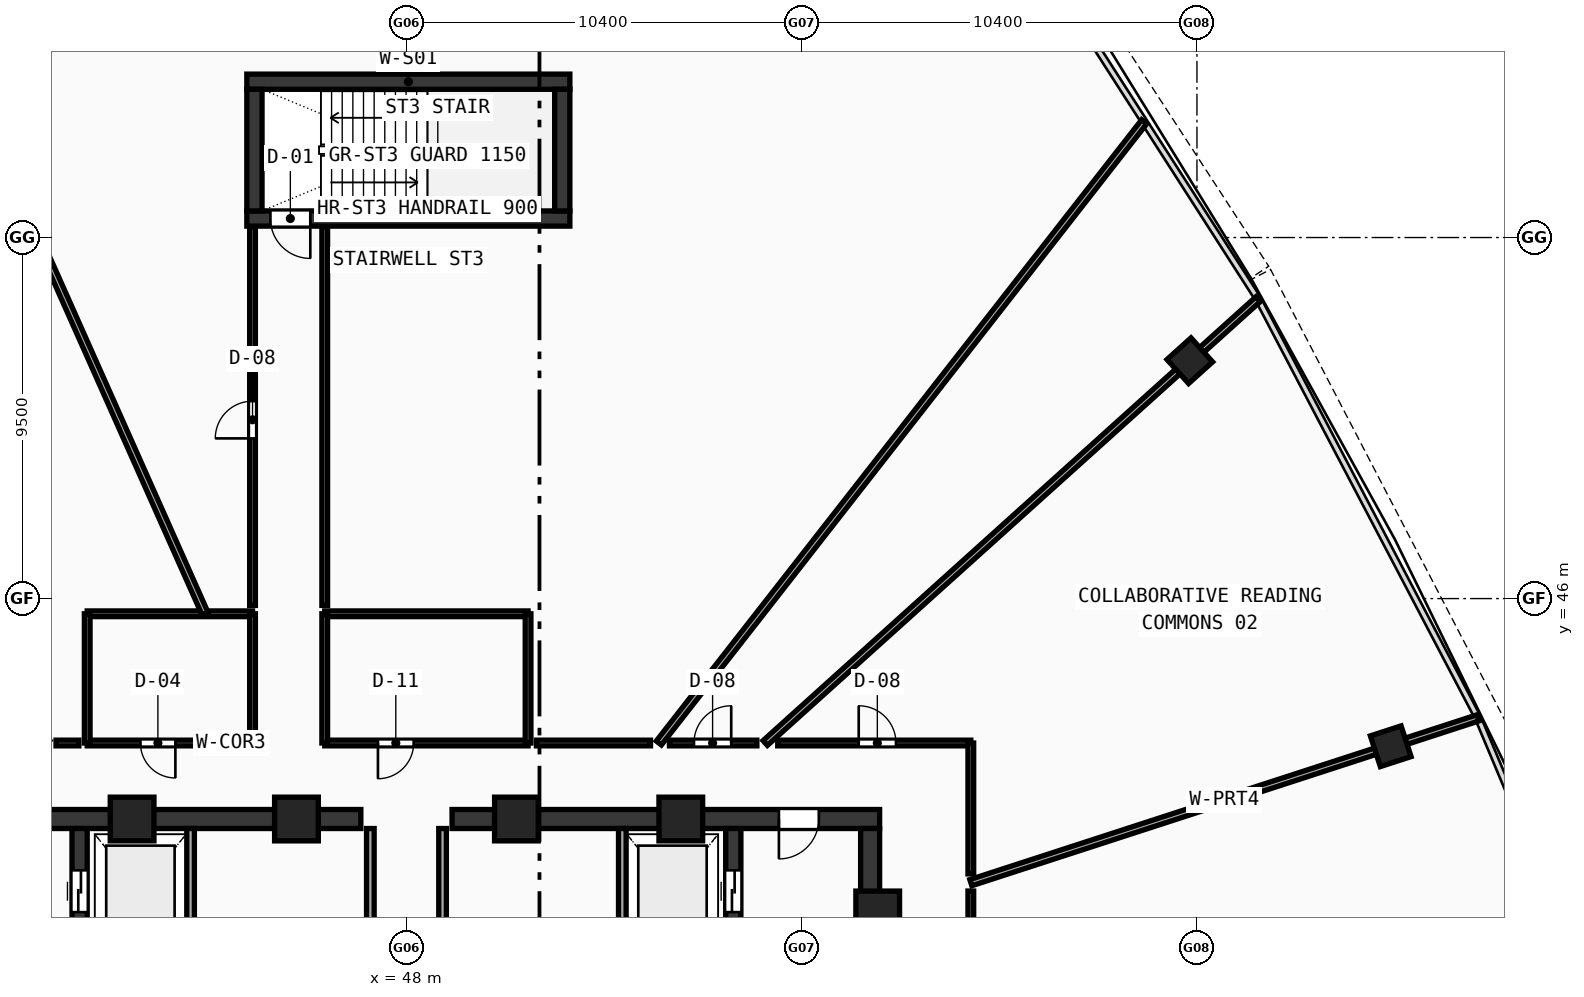
"""IFC4 building model, lengths in metres.
Left out: names, types, materials, properties, quantities, classifications, styles, units other than length and angle.
Written with IfcOpenShell. Run it as: python <this file> out.ifc"""

import sys

from ifc_helpers import new_model, si_unit, direction, frame, frame_2d, origin, origin_with_axes, origin_2d, place, context, subcontext, project, spatial, rectangle, hollow_rectangle, extrude, source, transform, mapped, element, fill, save


model = new_model("IFC4")
c1 = context("Model", 3, precision=1e-05, world=origin(), true_north=direction((0.0, 1.0)))
c2 = subcontext(c1, "Body", "Model", "MODEL_VIEW")
j1 = project(units=[si_unit("LENGTHUNIT", "METRE"), si_unit("PLANEANGLEUNIT", "RADIAN")], contexts=[c1])
p1 = place(None, origin())
s1 = spatial("IfcSite", under=j1, at=p1, CompositionType="ELEMENT")
p2 = place(p1, origin())
s2 = spatial("IfcBuilding", under=s1, at=p2, CompositionType="ELEMENT")
p3 = place(p2, frame((0.0, 0.0, 240.8)))
s3 = spatial("IfcBuildingStorey", under=s2, at=p3, CompositionType="ELEMENT", Elevation=240.8)
p4 = place(p3, frame((35.55, 40.2, 0.0), z_axis=(0.0, 0.0, 1.0), x_axis=(1.0, 0.0, 0.0)))
e1 = element("IfcWall", 1, at=p4, inside=s3, PredefinedType="SHEAR", context=c2, shape_type="SweptSolid", body=[
    extrude(rectangle(XDim=11.25, YDim=0.5, at=frame_2d((5.625, 0.0))), origin(), (0.0, 0.0, 1.0), 3.47),
])
p5 = place(p4, frame((1.6, 0.0, 0.0)))
e2 = element("IfcOpeningElement", 2, at=p5, cuts=e1, PredefinedType="OPENING", context=c2, shape_type="SweptSolid", body=[
    extrude(rectangle(XDim=1.05, YDim=2.1, at=frame_2d((0.525, 1.05))), frame((0.0, 0.26, 0.0), z_axis=(0.0, -1.0, 0.0), x_axis=(1.0, 0.0, 0.0)), (0.0, 0.0, 1.0), 0.52),
])
p6 = place(p3, frame((49.2, 40.2, 0.0), z_axis=(0.0, 0.0, 1.0), x_axis=(1.0, 0.0, 0.0)))
e3 = element("IfcWall", 3, at=p6, inside=s3, PredefinedType="SHEAR", context=c2, shape_type="SweptSolid", body=[
    extrude(rectangle(XDim=11.25, YDim=0.5, at=frame_2d((5.625, 0.0))), origin(), (0.0, 0.0, 1.0), 3.47),
])
p7 = place(p6, frame((8.6, 0.0, 0.0)))
e4 = element("IfcOpeningElement", 4, at=p7, cuts=e3, PredefinedType="OPENING", context=c2, shape_type="SweptSolid", body=[
    extrude(rectangle(XDim=1.05, YDim=2.1, at=frame_2d((0.525, 1.05))), frame((0.0, 0.26, 0.0), z_axis=(0.0, -1.0, 0.0), x_axis=(1.0, 0.0, 0.0)), (0.0, 0.0, 1.0), 0.52),
])
p8 = place(p3, frame((60.2, 27.75, 0.0), z_axis=(0.0, 0.0, 1.0), x_axis=(0.0, 1.0, 0.0)))
e5 = element("IfcWall", 5, at=p8, inside=s3, PredefinedType="SHEAR", context=c2, shape_type="SweptSolid", body=[
    extrude(rectangle(XDim=12.2, YDim=0.5, at=frame_2d((6.1, 0.0))), origin(), (0.0, 0.0, 1.0), 3.47),
])
p9 = place(p3, frame((39.4, 27.75, 0.0), z_axis=(0.0, 0.0, 1.0), x_axis=(0.0, 1.0, 0.0)))
e6 = element("IfcWall", 6, at=p9, inside=s3, PredefinedType="SHEAR", context=c2, shape_type="SweptSolid", body=[
    extrude(rectangle(XDim=12.2, YDim=0.4, at=frame_2d((6.1, 0.0))), origin(), (0.0, 0.0, 1.0), 3.47),
])
p10 = place(p9, frame((10.0, 0.0, 0.0)))
e7 = element("IfcOpeningElement", 7, at=p10, cuts=e6, PredefinedType="OPENING", context=c2, shape_type="SweptSolid", body=[
    extrude(rectangle(XDim=1.1, YDim=2.1, at=frame_2d((0.55, 1.05))), frame((0.0, 0.21, 0.0), z_axis=(0.0, -1.0, 0.0), x_axis=(1.0, 0.0, 0.0)), (0.0, 0.0, 1.0), 0.42),
])
p11 = place(p3, frame((56.6, 27.75, 0.0), z_axis=(0.0, 0.0, 1.0), x_axis=(0.0, 1.0, 0.0)))
e8 = element("IfcWall", 8, at=p11, inside=s3, PredefinedType="SHEAR", context=c2, shape_type="SweptSolid", body=[
    extrude(rectangle(XDim=12.2, YDim=0.4, at=frame_2d((6.1, 0.0))), origin(), (0.0, 0.0, 1.0), 3.47),
])
p12 = place(p11, frame((10.0, 0.0, 0.0)))
e9 = element("IfcOpeningElement", 9, at=p12, cuts=e8, PredefinedType="OPENING", context=c2, shape_type="SweptSolid", body=[
    extrude(rectangle(XDim=1.1, YDim=2.1, at=frame_2d((0.55, 1.05))), frame((0.0, 0.21, 0.0), z_axis=(0.0, -1.0, 0.0), x_axis=(1.0, 0.0, 0.0)), (0.0, 0.0, 1.0), 0.42),
])
p13 = place(p3, frame((43.8, 59.6, 0.0), z_axis=(0.0, 0.0, 1.0), x_axis=(1.0, 0.0, 0.0)))
e10 = element("IfcWall", 10, at=p13, inside=s3, PredefinedType="SHEAR", context=c2, shape_type="SweptSolid", body=[
    extrude(rectangle(XDim=8.5, YDim=0.4, at=frame_2d((4.25, 0.0))), origin(), (0.0, 0.0, 1.0), 3.47),
])
p14 = place(p3, frame((43.8, 56.0, 0.0), z_axis=(0.0, 0.0, 1.0), x_axis=(1.0, 0.0, 0.0)))
e11 = element("IfcWall", 11, at=p14, inside=s3, PredefinedType="SHEAR", context=c2, shape_type="SweptSolid", body=[
    extrude(rectangle(XDim=8.5, YDim=0.4, at=frame_2d((4.25, 0.0))), origin(), (0.0, 0.0, 1.0), 3.47),
])
p15 = place(p14, frame((0.62, 0.0, 0.0)))
e12 = element("IfcOpeningElement", 12, at=p15, cuts=e11, PredefinedType="OPENING", context=c2, shape_type="SweptSolid", body=[
    extrude(rectangle(XDim=1.05, YDim=2.1, at=frame_2d((0.525, 1.05))), frame((0.0, 0.21, 0.0), z_axis=(0.0, -1.0, 0.0), x_axis=(1.0, 0.0, 0.0)), (0.0, 0.0, 1.0), 0.42),
])
for number, where, z_axis, x_axis in (
    (13, (44.0, 56.2, 0.0), (0.0, 0.0, 1.0), (0.0, 1.0, 0.0)),
    (14, (52.1, 56.2, 0.0), (0.0, 0.0, 1.0), (0.0, 1.0, 0.0)),
):
    element("IfcWall", number, at=place(p3, frame(where, z_axis=z_axis, x_axis=x_axis)), inside=s3, PredefinedType="SHEAR", context=c2, shape_type="SweptSolid", body=[
        extrude(rectangle(XDim=3.2, YDim=0.4, at=frame_2d((1.6, 0.0))), origin(), (0.0, 0.0, 1.0), 3.47),
    ])
m1 = source(origin(), c2, "Body", "SweptSolid", [
    extrude(hollow_rectangle(XDim=1.15, YDim=1.15, WallThickness=0.048, at=origin_2d()), origin(), (0.0, 0.0, 1.0), 3.73),
])
for number, where, z_axis, x_axis in (
    (15, (60.4, 37.729, -0.26), (0.0, 0.0, 1.0), (1.0, 0.0, 0.0)),
    (16, (55.219, 40.2, -0.26), (0.0, 0.0, 1.0), (1.0, 0.0, 0.0)),
    (17, (50.894, 40.2, -0.26), (0.0, 0.0, 1.0), (1.0, 0.0, 0.0)),
    (18, (45.106, 40.2, -0.26), (0.0, 0.0, 1.0), (1.0, 0.0, 0.0)),
    (19, (40.781, 40.2, -0.26), (0.0, 0.0, 1.0), (1.0, 0.0, 0.0)),
):
    element("IfcColumn", number, at=place(p3, frame(where, z_axis=z_axis, x_axis=x_axis)), inside=s3, PredefinedType="COLUMN", context=c2, shape_type="MappedRepresentation", body=[
        mapped(m1, transform((0.0, 0.0, 0.0), scale=1.0)),
    ])
m2 = source(origin(), c2, "Body", "SweptSolid", [
    extrude(hollow_rectangle(XDim=0.85, YDim=0.85, WallThickness=0.034, at=origin_2d()), origin(), (0.0, 0.0, 1.0), 3.73),
])
for number, where, z_axis, x_axis in (
    (20, (73.899, 42.115, -0.26), (0.0, 0.0, 1.0), (-0.309, 0.951, 0.0)),
    (21, (68.612, 52.259, -0.26), (0.0, 0.0, 1.0), (-0.669, 0.743, 0.0)),
):
    element("IfcColumn", number, at=place(p3, frame(where, z_axis=z_axis, x_axis=x_axis)), inside=s3, PredefinedType="COLUMN", context=c2, shape_type="MappedRepresentation", body=[
        mapped(m2, transform((0.0, 0.0, 0.0), scale=1.0)),
    ])
p16 = place(p3, frame((42.32, 33.5, 0.0), z_axis=(0.0, 0.0, 1.0), x_axis=(0.0, 1.0, 0.0)))
e22 = element("IfcWall", 22, at=p16, inside=s3, PredefinedType="SOLIDWALL", context=c2, shape_type="SweptSolid", body=[
    extrude(rectangle(XDim=6.45, YDim=0.2, at=frame_2d((3.225, 0.0))), origin(), (0.0, 0.0, 1.0), 3.47),
])
p17 = place(p16, frame((1.0, 0.0, 0.0)))
e23 = element("IfcOpeningElement", 23, at=p17, cuts=e22, PredefinedType="OPENING", context=c2, shape_type="SweptSolid", body=[
    extrude(rectangle(XDim=1.05, YDim=2.1, at=frame_2d((0.525, 1.05))), frame((0.0, 0.11, 0.0), z_axis=(0.0, -1.0, 0.0), x_axis=(1.0, 0.0, 0.0)), (0.0, 0.0, 1.0), 0.22),
])
p18 = place(p3, frame((53.68, 36.65, 0.0), z_axis=(0.0, 0.0, 1.0), x_axis=(0.0, 1.0, 0.0)))
e24 = element("IfcWall", 24, at=p18, inside=s3, PredefinedType="SOLIDWALL", context=c2, shape_type="SweptSolid", body=[
    extrude(rectangle(XDim=3.3, YDim=0.2, at=frame_2d((1.65, 0.0))), origin(), (0.0, 0.0, 1.0), 3.47),
])
for number, where, z_axis, x_axis in (
    (25, (47.05, 35.85, 0.0), (0.0, 0.0, 1.0), (0.0, 1.0, 0.0)),
    (26, (48.95, 35.85, 0.0), (0.0, 0.0, 1.0), (0.0, 1.0, 0.0)),
):
    element("IfcWall", number, at=place(p3, frame(where, z_axis=z_axis, x_axis=x_axis)), inside=s3, PredefinedType="SOLIDWALL", context=c2, shape_type="SweptSolid", body=[
        extrude(rectangle(XDim=4.1, YDim=0.2, at=frame_2d((2.05, 0.0))), origin(), (0.0, 0.0, 1.0), 3.47),
    ])
p19 = place(p3, frame((39.6, 42.2, 0.0), z_axis=(0.0, 0.0, 1.0), x_axis=(1.0, 0.0, 0.0)))
e27 = element("IfcWall", 27, at=p19, inside=s3, PredefinedType="PARTITIONING", context=c2, shape_type="SweptSolid", body=[
    extrude(rectangle(XDim=4.35, YDim=0.15, at=frame_2d((2.175, 0.0))), origin(), (0.0, 0.0, 1.0), 3.47),
])
p20 = place(p19, frame((1.4, 0.0, 0.0)))
e28 = element("IfcOpeningElement", 28, at=p20, cuts=e27, PredefinedType="OPENING", context=c2, shape_type="SweptSolid", body=[
    extrude(rectangle(XDim=0.92, YDim=2.1, at=frame_2d((0.46, 1.05))), frame((0.0, 0.085, 0.0), z_axis=(0.0, -1.0, 0.0), x_axis=(1.0, 0.0, 0.0)), (0.0, 0.0, 1.0), 0.17),
])
p21 = place(p3, frame((39.6, 45.6, 0.0), z_axis=(0.0, 0.0, 1.0), x_axis=(1.0, 0.0, 0.0)))
e29 = element("IfcWall", 29, at=p21, inside=s3, PredefinedType="PARTITIONING", context=c2, shape_type="SweptSolid", body=[
    extrude(rectangle(XDim=4.35, YDim=0.15, at=frame_2d((2.175, 0.0))), origin(), (0.0, 0.0, 1.0), 2.82),
])
p22 = place(p3, frame((39.6, 42.2, 0.0), z_axis=(0.0, 0.0, 1.0), x_axis=(0.0, 1.0, 0.0)))
e30 = element("IfcWall", 30, at=p22, inside=s3, PredefinedType="PARTITIONING", context=c2, shape_type="SweptSolid", body=[
    extrude(rectangle(XDim=3.4, YDim=0.15, at=frame_2d((1.7, 0.0))), origin(), (0.0, 0.0, 1.0), 3.47),
])
p23 = place(p3, frame((43.95, 42.2, 0.0), z_axis=(0.0, 0.0, 1.0), x_axis=(0.0, 1.0, 0.0)))
e31 = element("IfcWall", 31, at=p23, inside=s3, PredefinedType="PARTITIONING", context=c2, shape_type="SweptSolid", body=[
    extrude(rectangle(XDim=3.4, YDim=0.15, at=frame_2d((1.7, 0.0))), origin(), (0.0, 0.0, 1.0), 2.82),
])
p24 = place(p3, frame((45.85, 42.2, 0.0), z_axis=(0.0, 0.0, 1.0), x_axis=(1.0, 0.0, 0.0)))
e32 = element("IfcWall", 32, at=p24, inside=s3, PredefinedType="PARTITIONING", context=c2, shape_type="SweptSolid", body=[
    extrude(rectangle(XDim=5.35, YDim=0.15, at=frame_2d((2.675, 0.0))), origin(), (0.0, 0.0, 1.0), 3.47),
])
p25 = place(p24, frame((1.4, 0.0, 0.0)))
e33 = element("IfcOpeningElement", 33, at=p25, cuts=e32, PredefinedType="OPENING", context=c2, shape_type="SweptSolid", body=[
    extrude(rectangle(XDim=0.94, YDim=2.1, at=frame_2d((0.47, 1.05))), frame((0.0, 0.085, 0.0), z_axis=(0.0, -1.0, 0.0), x_axis=(1.0, 0.0, 0.0)), (0.0, 0.0, 1.0), 0.17),
])
p26 = place(p3, frame((45.85, 45.6, 0.0), z_axis=(0.0, 0.0, 1.0), x_axis=(1.0, 0.0, 0.0)))
e34 = element("IfcWall", 34, at=p26, inside=s3, PredefinedType="PARTITIONING", context=c2, shape_type="SweptSolid", body=[
    extrude(rectangle(XDim=5.35, YDim=0.15, at=frame_2d((2.675, 0.0))), origin(), (0.0, 0.0, 1.0), 3.47),
])
for number, where, z_axis, x_axis in (
    (35, (45.85, 42.2, 0.0), (0.0, 0.0, 1.0), (0.0, 1.0, 0.0)),
    (36, (51.2, 42.2, 0.0), (0.0, 0.0, 1.0), (0.0, 1.0, 0.0)),
):
    element("IfcWall", number, at=place(p3, frame(where, z_axis=z_axis, x_axis=x_axis)), inside=s3, PredefinedType="PARTITIONING", context=c2, shape_type="SweptSolid", body=[
        extrude(rectangle(XDim=3.4, YDim=0.15, at=frame_2d((1.7, 0.0))), origin(), (0.0, 0.0, 1.0), 3.47),
    ])
p27 = place(p3, frame((62.85, 38.525, 0.0), z_axis=(0.0, 0.0, 1.0), x_axis=(0.951060404644, 0.309005027011, 0.0)))
e37 = element("IfcWall", 37, at=p27, inside=s3, PredefinedType="PARTITIONING", context=c2, shape_type="SweptSolid", body=[
    extrude(rectangle(XDim=14.032, YDim=0.17, at=frame_2d((7.016, 0.0))), origin(), (0.0, 0.0, 1.0), 2.82),
])
p28 = place(p3, frame((57.44, 42.2, 0.0), z_axis=(0.0, 0.0, 1.0), x_axis=(0.743140424774, 0.669135493802, 0.0)))
e38 = element("IfcWall", 38, at=p28, inside=s3, PredefinedType="PARTITIONING", context=c2, shape_type="SweptSolid", body=[
    extrude(rectangle(XDim=17.455, YDim=0.17, at=frame_2d((8.728, 0.0))), origin(), (0.0, 0.0, 1.0), 2.82),
])
p29 = place(p3, frame((54.641, 42.2, 0.0), z_axis=(0.0, 0.0, 1.0), x_axis=(0.615664824624, 0.788008136837, 0.0)))
e39 = element("IfcWall", 39, at=p29, inside=s3, PredefinedType="PARTITIONING", context=c2, shape_type="SweptSolid", body=[
    extrude(rectangle(XDim=20.745, YDim=0.17, at=frame_2d((10.372, 0.0))), origin(), (0.0, 0.0, 1.0), 2.82),
])
p30 = place(p3, frame((42.702, 45.6, 0.0), z_axis=(0.0, 0.0, 1.0), x_axis=(-0.406745472033, 0.913541526686, 0.0)))
e40 = element("IfcWall", 40, at=p30, inside=s3, PredefinedType="PARTITIONING", context=c2, shape_type="SweptSolid", body=[
    extrude(rectangle(XDim=22.574, YDim=0.17, at=frame_2d((11.287, 0.0))), origin(), (0.0, 0.0, 1.0), 2.82),
])
p31 = place(p3, frame((38.78, 42.2, 0.0), z_axis=(0.0, 0.0, 1.0), x_axis=(1.0, 0.0, 0.0)))
e41 = element("IfcWall", 41, at=p31, inside=s3, PredefinedType="PARTITIONING", context=c2, shape_type="SweptSolid", body=[
    extrude(rectangle(XDim=0.6, YDim=0.15, at=frame_2d((0.3, 0.0))), origin(), (0.0, 0.0, 1.0), 2.82),
])
p32 = place(p3, frame((43.95, 45.82, 0.0), z_axis=(0.0, 0.0, 1.0), x_axis=(0.0, 1.0, 0.0)))
e42 = element("IfcWall", 42, at=p32, inside=s3, PredefinedType="PARTITIONING", context=c2, shape_type="SweptSolid", body=[
    extrude(rectangle(XDim=9.96, YDim=0.15, at=frame_2d((4.98, 0.0))), origin(), (0.0, 0.0, 1.0), 3.12),
])
p33 = place(p32, frame((4.395, 0.0, 0.0)))
e43 = element("IfcOpeningElement", 43, at=p33, cuts=e42, PredefinedType="OPENING", context=c2, shape_type="SweptSolid", body=[
    extrude(rectangle(XDim=0.98, YDim=2.12, at=frame_2d((0.49, 1.06))), frame((0.0, 0.085, 0.0), z_axis=(0.0, -1.0, 0.0), x_axis=(1.0, 0.0, 0.0)), (0.0, 0.0, 1.0), 0.17),
])
p34 = place(p3, frame((45.85, 55.78, 0.0), z_axis=(0.0, 0.0, 1.0), x_axis=(0.0, -1.0, 0.0)))
e44 = element("IfcWall", 44, at=p34, inside=s3, PredefinedType="PARTITIONING", context=c2, shape_type="SweptSolid", body=[
    extrude(rectangle(XDim=9.96, YDim=0.15, at=frame_2d((4.98, 0.0))), origin(), (0.0, 0.0, 1.0), 3.12),
])
p35 = place(p3, frame((51.42, 42.2, 0.0), z_axis=(0.0, 0.0, 1.0), x_axis=(1.0, 0.0, 0.0)))
e45 = element("IfcWall", 45, at=p35, inside=s3, PredefinedType="PARTITIONING", context=c2, shape_type="SweptSolid", body=[
    extrude(rectangle(XDim=3.001, YDim=0.15, at=frame_2d((1.5, 0.0))), origin(), (0.0, 0.0, 1.0), 2.82),
])
p36 = place(p3, frame((54.92, 42.2, 0.0), z_axis=(0.0, 0.0, 1.0), x_axis=(1.0, 0.0, 0.0)))
e46 = element("IfcWall", 46, at=p36, inside=s3, PredefinedType="PARTITIONING", context=c2, shape_type="SweptSolid", body=[
    extrude(rectangle(XDim=2.3, YDim=0.15, at=frame_2d((1.15, 0.0))), origin(), (0.0, 0.0, 1.0), 2.82),
])
p37 = place(p36, frame((0.646, 0.0, 0.0)))
e47 = element("IfcOpeningElement", 47, at=p37, cuts=e46, PredefinedType="OPENING", context=c2, shape_type="SweptSolid", body=[
    extrude(rectangle(XDim=0.98, YDim=2.12, at=frame_2d((0.49, 1.06))), frame((0.0, 0.085, 0.0), z_axis=(0.0, -1.0, 0.0), x_axis=(1.0, 0.0, 0.0)), (0.0, 0.0, 1.0), 0.17),
])
p38 = place(p3, frame((57.769, 42.2, 0.0), z_axis=(0.0, 0.0, 1.0), x_axis=(1.0, 0.0, 0.0)))
e48 = element("IfcWall", 48, at=p38, inside=s3, PredefinedType="PARTITIONING", context=c2, shape_type="SweptSolid", body=[
    extrude(rectangle(XDim=5.081, YDim=0.15, at=frame_2d((2.541, 0.0))), origin(), (0.0, 0.0, 1.0), 3.12),
])
p39 = place(p38, frame((2.131, 0.0, 0.0)))
e49 = element("IfcOpeningElement", 49, at=p39, cuts=e48, PredefinedType="OPENING", context=c2, shape_type="SweptSolid", body=[
    extrude(rectangle(XDim=0.98, YDim=2.12, at=frame_2d((0.49, 1.06))), frame((0.0, 0.085, 0.0), z_axis=(0.0, -1.0, 0.0), x_axis=(1.0, 0.0, 0.0)), (0.0, 0.0, 1.0), 0.17),
])
p40 = place(p3, frame((62.85, 42.2, 0.0), z_axis=(0.0, 0.0, 1.0), x_axis=(0.0, -1.0, 0.0)))
e50 = element("IfcWall", 50, at=p40, inside=s3, PredefinedType="PARTITIONING", context=c2, shape_type="SweptSolid", body=[
    extrude(rectangle(XDim=3.444, YDim=0.15, at=frame_2d((1.722, 0.0))), origin(), (0.0, 0.0, 1.0), 3.12),
])
p41 = place(p3, frame((62.85, 38.305, 0.0), z_axis=(0.0, 0.0, 1.0), x_axis=(0.0, -1.0, 0.0)))
e51 = element("IfcWall", 51, at=p41, inside=s3, PredefinedType="PARTITIONING", context=c2, shape_type="SweptSolid", body=[
    extrude(rectangle(XDim=7.004, YDim=0.15, at=frame_2d((3.502, 0.0))), origin(), (0.0, 0.0, 1.0), 3.47),
])
p42 = place(p41, frame((3.042, 0.0, 0.0)))
e52 = element("IfcOpeningElement", 52, at=p42, cuts=e51, PredefinedType="OPENING", context=c2, shape_type="SweptSolid", body=[
    extrude(rectangle(XDim=0.92, YDim=2.1, at=frame_2d((0.46, 1.05))), frame((0.0, 0.085, 0.0), z_axis=(0.0, -1.0, 0.0), x_axis=(1.0, 0.0, 0.0)), (0.0, 0.0, 1.0), 0.17),
])
m3 = source(origin(), c2, "Body", "SweptSolid", [
    extrude(rectangle(XDim=1.05, YDim=2.1, at=frame_2d((0.525, 1.05))), frame((0.0, 0.025, 0.0), z_axis=(0.0, -1.0, 0.0), x_axis=(1.0, 0.0, 0.0)), (0.0, 0.0, 1.0), 0.05),
])
p43 = place(p7, frame((1.05, 0.0, 0.0), z_axis=(0.0, 0.0, 1.0), x_axis=(-1.0, 0.0, 0.0)))
e53 = element("IfcDoor", 53, at=p43, inside=s3, OperationType="SINGLE_SWING_RIGHT", PredefinedType="DOOR", context=c2, shape_type="MappedRepresentation", body=[
    mapped(m3, transform((0.0, 0.0, 0.0), scale=1.0)),
])
fill(e4, e53)
m4 = source(origin(), c2, "Body", "SweptSolid", [
    extrude(rectangle(XDim=1.1, YDim=2.1, at=frame_2d((0.55, 1.05))), frame((0.0, 0.025, 0.0), z_axis=(0.0, -1.0, 0.0), x_axis=(1.0, 0.0, 0.0)), (0.0, 0.0, 1.0), 0.05),
])
p44 = place(p10, frame((1.1, 0.0, 0.0), z_axis=(0.0, 0.0, 1.0), x_axis=(-1.0, 0.0, 0.0)))
e54 = element("IfcDoor", 54, at=p44, inside=s3, OperationType="DOUBLE_DOOR_SLIDING", PredefinedType="DOOR", context=c2, shape_type="MappedRepresentation", body=[
    mapped(m4, transform((0.0, 0.0, 0.0), scale=1.0)),
])
fill(e7, e54)
p45 = place(p12, origin_with_axes())
e55 = element("IfcDoor", 55, at=p45, inside=s3, OperationType="DOUBLE_DOOR_SLIDING", PredefinedType="DOOR", context=c2, shape_type="MappedRepresentation", body=[
    mapped(m4, transform((0.0, 0.0, 0.0), scale=1.0)),
])
fill(e9, e55)
p46 = place(p15, frame((1.05, 0.0, 0.0), z_axis=(0.0, 0.0, 1.0), x_axis=(-1.0, 0.0, 0.0)))
e56 = element("IfcDoor", 56, at=p46, inside=s3, OperationType="SINGLE_SWING_LEFT", PredefinedType="DOOR", context=c2, shape_type="MappedRepresentation", body=[
    mapped(m3, transform((0.0, 0.0, 0.0), scale=1.0)),
])
fill(e12, e56)
m5 = source(origin(), c2, "Body", "SweptSolid", [
    extrude(rectangle(XDim=0.92, YDim=2.1, at=frame_2d((0.46, 1.05))), frame((0.0, 0.025, 0.0), z_axis=(0.0, -1.0, 0.0), x_axis=(1.0, 0.0, 0.0)), (0.0, 0.0, 1.0), 0.05),
])
p47 = place(p20, frame((0.92, 0.0, 0.0), z_axis=(0.0, 0.0, 1.0), x_axis=(-1.0, 0.0, 0.0)))
e57 = element("IfcDoor", 57, at=p47, inside=s3, OperationType="SINGLE_SWING_LEFT", PredefinedType="DOOR", context=c2, shape_type="MappedRepresentation", body=[
    mapped(m5, transform((0.0, 0.0, 0.0), scale=1.0)),
])
fill(e28, e57)
m6 = source(origin(), c2, "Body", "SweptSolid", [
    extrude(rectangle(XDim=0.94, YDim=2.1, at=frame_2d((0.47, 1.05))), frame((0.0, 0.025, 0.0), z_axis=(0.0, -1.0, 0.0), x_axis=(1.0, 0.0, 0.0)), (0.0, 0.0, 1.0), 0.05),
])
p48 = place(p25, frame((0.94, 0.0, 0.0), z_axis=(0.0, 0.0, 1.0), x_axis=(-1.0, 0.0, 0.0)))
e58 = element("IfcDoor", 58, at=p48, inside=s3, OperationType="SINGLE_SWING_RIGHT", PredefinedType="DOOR", context=c2, shape_type="MappedRepresentation", body=[
    mapped(m6, transform((0.0, 0.0, 0.0), scale=1.0)),
])
fill(e33, e58)
m7 = source(origin(), c2, "Body", "SweptSolid", [
    extrude(rectangle(XDim=0.98, YDim=2.12, at=frame_2d((0.49, 1.06))), frame((0.0, 0.025, 0.0), z_axis=(0.0, -1.0, 0.0), x_axis=(1.0, 0.0, 0.0)), (0.0, 0.0, 1.0), 0.05),
])
p49 = place(p39, origin_with_axes())
e59 = element("IfcDoor", 59, at=p49, inside=s3, OperationType="SINGLE_SWING_LEFT", PredefinedType="DOOR", context=c2, shape_type="MappedRepresentation", body=[
    mapped(m7, transform((0.0, 0.0, 0.0), scale=1.0)),
])
fill(e49, e59)
p50 = place(p37, origin_with_axes())
e60 = element("IfcDoor", 60, at=p50, inside=s3, OperationType="SINGLE_SWING_RIGHT", PredefinedType="DOOR", context=c2, shape_type="MappedRepresentation", body=[
    mapped(m7, transform((0.0, 0.0, 0.0), scale=1.0)),
])
fill(e47, e60)
p51 = place(p33, origin_with_axes())
e61 = element("IfcDoor", 61, at=p51, inside=s3, OperationType="SINGLE_SWING_LEFT", PredefinedType="DOOR", context=c2, shape_type="MappedRepresentation", body=[
    mapped(m7, transform((0.0, 0.0, 0.0), scale=1.0)),
])
fill(e43, e61)
save(model, sys.argv[1])
